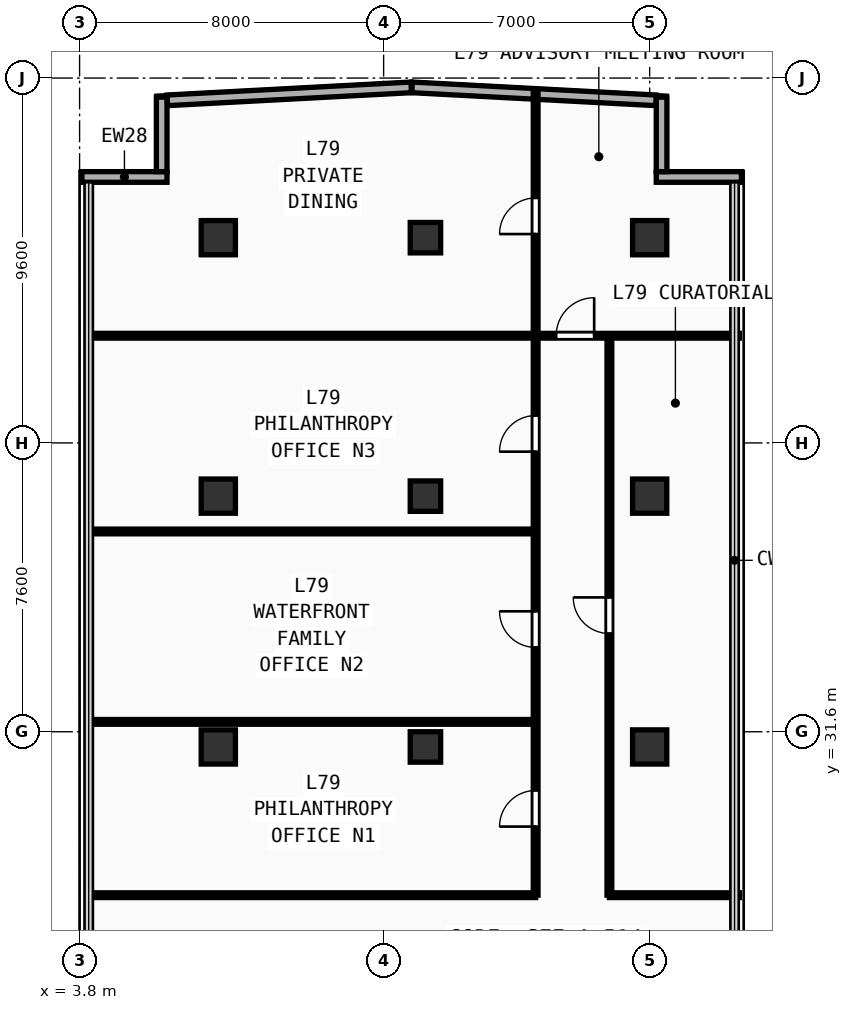
"""IFC4 building model, lengths in metres.
Left out: names, types, materials, properties, quantities, classifications, styles, units other than length and angle.
Written with IfcOpenShell. Run it as: python <this file> out.ifc"""

import sys

from ifc_helpers import new_model, si_unit, direction, frame, frame_2d, origin, origin_2d, place, context, subcontext, project, spatial, rectangle, extrude, element, fill, save


model = new_model("IFC4")
c1 = context("Model", 3, precision=1e-05, world=origin(), true_north=direction((0.0, 1.0)))
c2 = subcontext(c1, "Body", "Model", "MODEL_VIEW")
j1 = project(units=[si_unit("LENGTHUNIT", "METRE"), si_unit("PLANEANGLEUNIT", "RADIAN")], contexts=[c1])
p1 = place(None, origin())
s1 = spatial("IfcSite", under=j1, at=p1, CompositionType="ELEMENT")
p2 = place(p1, origin())
s2 = spatial("IfcBuilding", under=s1, at=p2, CompositionType="ELEMENT")
p3 = place(p2, frame((0.0, 0.0, 308.4)))
s3 = spatial("IfcBuildingStorey", under=s2, at=p3, CompositionType="ELEMENT", Elevation=308.4)
for number, where, z_axis, x_axis in (
    (1, (7.45, 31.2, 0.0), (0.0, 0.0, 1.0), (1.0, 0.0, 0.0)),
    (2, (7.45, 37.8, 0.0), (0.0, 0.0, 1.0), (1.0, 0.0, 0.0)),
    (3, (7.45, 44.6, 0.0), (0.0, 0.0, 1.0), (1.0, 0.0, 0.0)),
    (4, (18.8, 31.2, 0.0), (0.0, 0.0, 1.0), (1.0, 0.0, 0.0)),
    (5, (18.8, 37.8, 0.0), (0.0, 0.0, 1.0), (1.0, 0.0, 0.0)),
    (6, (18.8, 44.6, 0.0), (0.0, 0.0, 1.0), (1.0, 0.0, 0.0)),
):
    element("IfcColumn", number, at=place(p3, frame(where, z_axis=z_axis, x_axis=x_axis)), inside=s3, PredefinedType="COLUMN", context=c2, shape_type="SweptSolid", body=[
        extrude(rectangle(XDim=0.9, YDim=0.9, at=origin_2d()), origin(), (0.0, 0.0, 1.0), 3.56),
    ])
for number, where, z_axis, x_axis in (
    (7, (12.9, 31.2, 0.0), (0.0, 0.0, 1.0), (1.0, 0.0, 0.0)),
    (8, (12.9, 37.8, 0.0), (0.0, 0.0, 1.0), (1.0, 0.0, 0.0)),
    (9, (12.9, 44.6, 0.0), (0.0, 0.0, 1.0), (1.0, 0.0, 0.0)),
):
    element("IfcColumn", number, at=place(p3, frame(where, z_axis=z_axis, x_axis=x_axis)), inside=s3, PredefinedType="COLUMN", context=c2, shape_type="SweptSolid", body=[
        extrude(rectangle(XDim=0.8, YDim=0.8, at=origin_2d()), origin(), (0.0, 0.0, 1.0), 3.56),
    ])
p4 = place(p3, frame((18.974, 46.198, 0.0), z_axis=(0.0, 0.0, 1.0), x_axis=(1.0, 0.0, 0.0)))
e10 = element("IfcWall", 10, at=p4, inside=s3, PredefinedType="SOLIDWALL", context=c2, shape_type="SweptSolid", body=[
    extrude(rectangle(XDim=2.24, YDim=0.28, at=frame_2d((1.12, 0.0))), origin(), (0.0, 0.0, 1.0), 3.56),
])
p5 = place(p3, frame((19.114, 46.338, 0.0), z_axis=(0.0, 0.0, 1.0), x_axis=(0.0, 1.0, 0.0)))
e11 = element("IfcWall", 11, at=p5, inside=s3, PredefinedType="SOLIDWALL", context=c2, shape_type="SweptSolid", body=[
    extrude(rectangle(XDim=1.96, YDim=0.28, at=frame_2d((0.98, 0.0))), origin(), (0.0, 0.0, 1.0), 3.56),
])
p6 = place(p3, frame((3.86, 46.198, 0.0), z_axis=(0.0, 0.0, 1.0), x_axis=(1.0, 0.0, 0.0)))
e12 = element("IfcWall", 12, at=p6, inside=s3, PredefinedType="SOLIDWALL", context=c2, shape_type="SweptSolid", body=[
    extrude(rectangle(XDim=2.24, YDim=0.28, at=frame_2d((1.12, 0.0))), origin(), (0.0, 0.0, 1.0), 3.56),
])
p7 = place(p3, frame((5.96, 46.338, 0.0), z_axis=(0.0, 0.0, 1.0), x_axis=(0.0, 1.0, 0.0)))
e13 = element("IfcWall", 13, at=p7, inside=s3, PredefinedType="SOLIDWALL", context=c2, shape_type="SweptSolid", body=[
    extrude(rectangle(XDim=1.96, YDim=0.28, at=frame_2d((0.98, 0.0))), origin(), (0.0, 0.0, 1.0), 3.56),
])
for number, where, z_axis, x_axis in (
    (14, (18.966, 48.214, 0.0), (0.0, 0.0, 1.0), (-0.999, 0.053, 0.0)),
    (15, (12.525, 48.555, 0.0), (0.0, 0.0, 1.0), (-0.999, -0.053, 0.0)),
):
    element("IfcWall", number, at=place(p3, frame(where, z_axis=z_axis, x_axis=x_axis)), inside=s3, PredefinedType="SOLIDWALL", context=c2, shape_type="SweptSolid", body=[
        extrude(rectangle(XDim=6.426, YDim=0.28, at=frame_2d((3.213, 0.0))), origin(), (0.0, 0.0, 1.0), 3.56),
    ])
p8 = place(p3, frame((4.04, 27.3, 0.0), z_axis=(0.0, 0.0, 1.0), x_axis=(1.0, 0.0, 0.0)))
e16 = element("IfcWall", 16, at=p8, inside=s3, PredefinedType="PARTITIONING", context=c2, shape_type="SweptSolid", body=[
    extrude(rectangle(XDim=11.76, YDim=0.125, at=frame_2d((5.88, 0.0))), origin(), (0.0, 0.0, 1.0), 3.56),
])
p9 = place(p3, frame((15.8, 27.3, 0.0), z_axis=(0.0, 0.0, 1.0), x_axis=(0.0, 1.0, 0.0)))
e17 = element("IfcWall", 17, at=p9, inside=s3, PredefinedType="PARTITIONING", context=c2, shape_type="SweptSolid", body=[
    extrude(rectangle(XDim=14.72, YDim=0.125, at=frame_2d((7.36, 0.0))), origin(), (0.0, 0.0, 1.0), 3.56),
])
p10 = place(p9, frame((1.805, 0.0, 0.0)))
e18 = element("IfcOpeningElement", 18, at=p10, cuts=e17, PredefinedType="OPENING", context=c2, shape_type="SweptSolid", body=[
    extrude(rectangle(XDim=0.95, YDim=2.15, at=frame_2d((0.475, 1.075))), frame((0.0, 0.073, 0.0), z_axis=(0.0, -1.0, 0.0), x_axis=(1.0, 0.0, 0.0)), (0.0, 0.0, 1.0), 0.145),
])
p11 = place(p9, frame((6.519, 0.0, 0.0)))
e19 = element("IfcOpeningElement", 19, at=p11, cuts=e17, PredefinedType="OPENING", context=c2, shape_type="SweptSolid", body=[
    extrude(rectangle(XDim=0.95, YDim=2.15, at=frame_2d((0.475, 1.075))), frame((0.0, 0.073, 0.0), z_axis=(0.0, -1.0, 0.0), x_axis=(1.0, 0.0, 0.0)), (0.0, 0.0, 1.0), 0.145),
])
p12 = place(p9, frame((11.67, 0.0, 0.0)))
e20 = element("IfcOpeningElement", 20, at=p12, cuts=e17, PredefinedType="OPENING", context=c2, shape_type="SweptSolid", body=[
    extrude(rectangle(XDim=0.95, YDim=2.15, at=frame_2d((0.475, 1.075))), frame((0.0, 0.073, 0.0), z_axis=(0.0, -1.0, 0.0), x_axis=(1.0, 0.0, 0.0)), (0.0, 0.0, 1.0), 0.145),
])
for number, where, z_axis, x_axis in (
    (21, (4.04, 31.86, 0.0), (0.0, 0.0, 1.0), (1.0, 0.0, 0.0)),
    (22, (4.04, 36.87, 0.0), (0.0, 0.0, 1.0), (1.0, 0.0, 0.0)),
):
    element("IfcWall", number, at=place(p3, frame(where, z_axis=z_axis, x_axis=x_axis)), inside=s3, PredefinedType="PARTITIONING", context=c2, shape_type="SweptSolid", body=[
        extrude(rectangle(XDim=11.76, YDim=0.125, at=frame_2d((5.88, 0.0))), origin(), (0.0, 0.0, 1.0), 3.56),
    ])
p13 = place(p3, frame((4.04, 42.02, 0.0), z_axis=(0.0, 0.0, 1.0), x_axis=(1.0, 0.0, 0.0)))
e23 = element("IfcWall", 23, at=p13, inside=s3, PredefinedType="PARTITIONING", context=c2, shape_type="SweptSolid", body=[
    extrude(rectangle(XDim=17.12, YDim=0.125, at=frame_2d((8.56, 0.0))), origin(), (0.0, 0.0, 1.0), 3.26),
])
p14 = place(p13, frame((12.3, 0.0, 0.0)))
e24 = element("IfcOpeningElement", 24, at=p14, cuts=e23, PredefinedType="OPENING", context=c2, shape_type="SweptSolid", body=[
    extrude(rectangle(XDim=1.0, YDim=2.2, at=frame_2d((0.5, 1.1))), frame((0.0, 0.073, 0.0), z_axis=(0.0, -1.0, 0.0), x_axis=(1.0, 0.0, 0.0)), (0.0, 0.0, 1.0), 0.145),
])
p15 = place(p3, frame((15.8, 42.02, 0.0), z_axis=(0.0, 0.0, 1.0), x_axis=(0.0, 1.0, 0.0)))
e25 = element("IfcWall", 25, at=p15, inside=s3, PredefinedType="PARTITIONING", context=c2, shape_type="SweptSolid", body=[
    extrude(rectangle(XDim=6.456, YDim=0.125, at=frame_2d((3.228, 0.0))), origin(), (0.0, 0.0, 1.0), 3.56),
])
p16 = place(p15, frame((2.676, 0.0, 0.0)))
e26 = element("IfcOpeningElement", 26, at=p16, cuts=e25, PredefinedType="OPENING", context=c2, shape_type="SweptSolid", body=[
    extrude(rectangle(XDim=0.95, YDim=2.15, at=frame_2d((0.475, 1.075))), frame((0.0, 0.073, 0.0), z_axis=(0.0, -1.0, 0.0), x_axis=(1.0, 0.0, 0.0)), (0.0, 0.0, 1.0), 0.145),
])
p17 = place(p3, frame((17.74, 27.3, 0.0), z_axis=(0.0, 0.0, 1.0), x_axis=(1.0, 0.0, 0.0)))
e27 = element("IfcWall", 27, at=p17, inside=s3, PredefinedType="PARTITIONING", context=c2, shape_type="SweptSolid", body=[
    extrude(rectangle(XDim=3.42, YDim=0.125, at=frame_2d((1.71, 0.0))), origin(), (0.0, 0.0, 1.0), 3.56),
])
p18 = place(p3, frame((17.74, 27.3, 0.0), z_axis=(0.0, 0.0, 1.0), x_axis=(0.0, 1.0, 0.0)))
e28 = element("IfcWall", 28, at=p18, inside=s3, PredefinedType="PARTITIONING", context=c2, shape_type="SweptSolid", body=[
    extrude(rectangle(XDim=14.72, YDim=0.125, at=frame_2d((7.36, 0.0))), origin(), (0.0, 0.0, 1.0), 3.56),
])
p19 = place(p18, frame((6.885, 0.0, 0.0)))
e29 = element("IfcOpeningElement", 29, at=p19, cuts=e28, PredefinedType="OPENING", context=c2, shape_type="SweptSolid", body=[
    extrude(rectangle(XDim=0.95, YDim=2.15, at=frame_2d((0.475, 1.075))), frame((0.0, 0.073, 0.0), z_axis=(0.0, -1.0, 0.0), x_axis=(1.0, 0.0, 0.0)), (0.0, 0.0, 1.0), 0.145),
])
p20 = place(p10, origin())
e30 = element("IfcDoor", 30, at=p20, inside=s3, OperationType="SINGLE_SWING_LEFT", PredefinedType="DOOR", context=c2, shape_type="SweptSolid", body=[
    extrude(rectangle(XDim=0.95, YDim=2.15, at=frame_2d((0.475, 1.075))), frame((0.0, 0.025, 0.0), z_axis=(0.0, -1.0, 0.0), x_axis=(1.0, 0.0, 0.0)), (0.0, 0.0, 1.0), 0.05),
])
fill(e18, e30)
p21 = place(p11, origin())
e31 = element("IfcDoor", 31, at=p21, inside=s3, OperationType="SINGLE_SWING_RIGHT", PredefinedType="DOOR", context=c2, shape_type="SweptSolid", body=[
    extrude(rectangle(XDim=0.95, YDim=2.15, at=frame_2d((0.475, 1.075))), frame((0.0, 0.025, 0.0), z_axis=(0.0, -1.0, 0.0), x_axis=(1.0, 0.0, 0.0)), (0.0, 0.0, 1.0), 0.05),
])
fill(e19, e31)
p22 = place(p12, origin())
e32 = element("IfcDoor", 32, at=p22, inside=s3, OperationType="SINGLE_SWING_LEFT", PredefinedType="DOOR", context=c2, shape_type="SweptSolid", body=[
    extrude(rectangle(XDim=0.95, YDim=2.15, at=frame_2d((0.475, 1.075))), frame((0.0, 0.025, 0.0), z_axis=(0.0, -1.0, 0.0), x_axis=(1.0, 0.0, 0.0)), (0.0, 0.0, 1.0), 0.05),
])
fill(e20, e32)
p23 = place(p14, origin())
e33 = element("IfcDoor", 33, at=p23, inside=s3, OperationType="SINGLE_SWING_RIGHT", PredefinedType="DOOR", context=c2, shape_type="SweptSolid", body=[
    extrude(rectangle(XDim=1.0, YDim=2.2, at=frame_2d((0.5, 1.1))), frame((0.0, 0.025, 0.0), z_axis=(0.0, -1.0, 0.0), x_axis=(1.0, 0.0, 0.0)), (0.0, 0.0, 1.0), 0.05),
])
fill(e24, e33)
p24 = place(p16, origin())
e34 = element("IfcDoor", 34, at=p24, inside=s3, OperationType="SINGLE_SWING_LEFT", PredefinedType="DOOR", context=c2, shape_type="SweptSolid", body=[
    extrude(rectangle(XDim=0.95, YDim=2.15, at=frame_2d((0.475, 1.075))), frame((0.0, 0.025, 0.0), z_axis=(0.0, -1.0, 0.0), x_axis=(1.0, 0.0, 0.0)), (0.0, 0.0, 1.0), 0.05),
])
fill(e26, e34)
p25 = place(p19, origin())
e35 = element("IfcDoor", 35, at=p25, inside=s3, OperationType="SINGLE_SWING_RIGHT", PredefinedType="DOOR", context=c2, shape_type="SweptSolid", body=[
    extrude(rectangle(XDim=0.95, YDim=2.15, at=frame_2d((0.475, 1.075))), frame((0.0, 0.025, 0.0), z_axis=(0.0, -1.0, 0.0), x_axis=(1.0, 0.0, 0.0)), (0.0, 0.0, 1.0), 0.05),
])
fill(e29, e35)
save(model, sys.argv[1])
